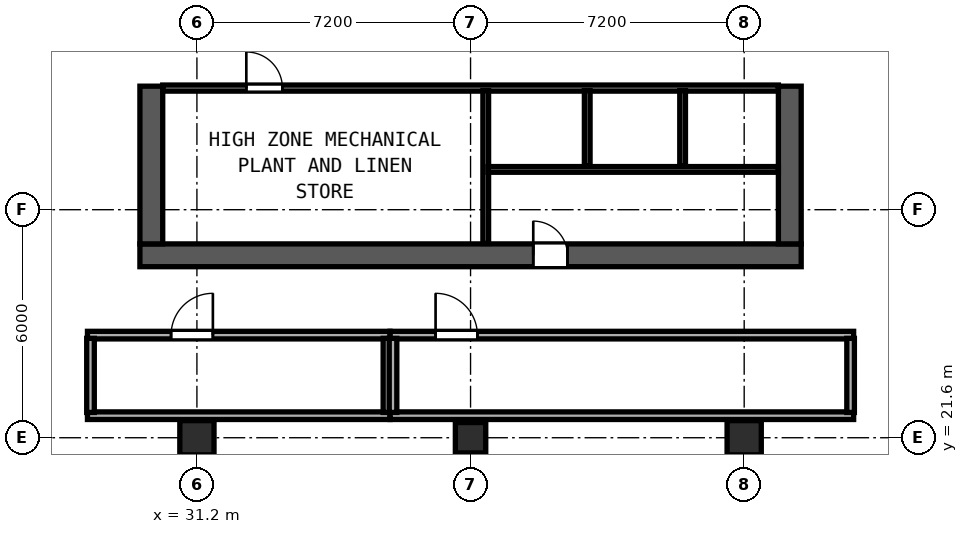
"""IFC4 building model, lengths in metres.
Left out: names, types, materials, properties, quantities, classifications, styles, units other than length and angle.
Written with IfcOpenShell. Run it as: python <this file> out.ifc"""

import sys

from ifc_helpers import new_model, si_unit, direction, frame, frame_2d, origin, origin_2d, place, context, subcontext, project, spatial, rectangle, hollow_rectangle, extrude, element, fill, save


model = new_model("IFC4")
c1 = context("Model", 3, precision=1e-05, world=origin(), true_north=direction((0.0, 1.0)))
c2 = subcontext(c1, "Body", "Model", "MODEL_VIEW")
j1 = project(units=[si_unit("LENGTHUNIT", "METRE"), si_unit("PLANEANGLEUNIT", "RADIAN")], contexts=[c1])
p1 = place(None, origin())
s1 = spatial("IfcSite", under=j1, at=p1, CompositionType="ELEMENT")
p2 = place(p1, origin())
s2 = spatial("IfcBuilding", under=s1, at=p2, CompositionType="ELEMENT")
p3 = place(p2, frame((0.0, 0.0, 207.0)))
s3 = spatial("IfcBuildingStorey", under=s2, at=p3, CompositionType="ELEMENT", Elevation=207.0)
p4 = place(p3, frame((29.7, 26.4, 0.0), z_axis=(0.0, 0.0, 1.0), x_axis=(1.0, 0.0, 0.0)))
e1 = element("IfcWall", 1, at=p4, inside=s3, PredefinedType="SHEAR", context=c2, shape_type="SweptSolid", body=[
    extrude(rectangle(XDim=17.4, YDim=0.6, at=frame_2d((8.7, 0.0))), origin(), (0.0, 0.0, 1.0), 4.42),
])
p5 = place(p4, frame((11.25, 0.0, 0.0), z_axis=(0.0, 0.0, 1.0), x_axis=(-1.0, 0.0, 0.0)))
e2 = element("IfcOpeningElement", 2, at=p5, cuts=e1, PredefinedType="OPENING", context=c2, shape_type="SweptSolid", body=[
    extrude(rectangle(XDim=0.9, YDim=2.1, at=frame_2d((0.45, 1.05))), frame((0.0, 0.31, 0.0), z_axis=(0.0, -1.0, 0.0), x_axis=(1.0, 0.0, 0.0)), (0.0, 0.0, 1.0), 0.62),
])
for number, where, z_axis, x_axis in (
    (3, (30.0, 26.7, 0.0), (0.0, 0.0, 1.0), (0.0, 1.0, 0.0)),
    (4, (46.8, 26.7, 0.0), (0.0, 0.0, 1.0), (0.0, 1.0, 0.0)),
):
    element("IfcWall", number, at=place(p3, frame(where, z_axis=z_axis, x_axis=x_axis)), inside=s3, PredefinedType="SHEAR", context=c2, shape_type="SweptSolid", body=[
        extrude(rectangle(XDim=4.15, YDim=0.6, at=frame_2d((2.075, 0.0))), origin(), (0.0, 0.0, 1.0), 4.42),
    ])
for number, where, z_axis, x_axis in (
    (5, (31.2, 21.6, 0.0), (0.0, 0.0, 1.0), (1.0, 0.0, 0.0)),
    (6, (45.6, 21.6, 0.0), (0.0, 0.0, 1.0), (1.0, 0.0, 0.0)),
):
    element("IfcColumn", number, at=place(p3, frame(where, z_axis=z_axis, x_axis=x_axis)), inside=s3, PredefinedType="COLUMN", context=c2, shape_type="SweptSolid", body=[
        extrude(hollow_rectangle(XDim=0.9, YDim=0.9, WallThickness=0.034, at=origin_2d()), origin(), (0.0, 0.0, 1.0), 4.6),
    ])
p6 = place(p3, frame((38.4, 21.6, 0.0), z_axis=(0.0, 0.0, 1.0), x_axis=(1.0, 0.0, 0.0)))
e7 = element("IfcColumn", 7, at=p6, inside=s3, PredefinedType="COLUMN", context=c2, shape_type="SweptSolid", body=[
    extrude(hollow_rectangle(XDim=0.8, YDim=0.8, WallThickness=0.03, at=origin_2d()), origin(), (0.0, 0.0, 1.0), 4.6),
])
p7 = place(p3, frame((47.987, 20.51, 0.0), z_axis=(0.0, 0.0, 1.0), x_axis=(0.970145687294, 0.242522876086, 0.0)))
e8 = element("IfcWall", 8, at=p7, inside=s3, PredefinedType="PARAPET", context=c2, shape_type="SweptSolid", body=[
    extrude(rectangle(XDim=4.506, YDim=0.16, at=frame_2d((2.253, 0.0))), origin(), (0.0, 0.0, 1.0), 1.15),
])
p8 = place(p3, frame((24.442, 21.603, 0.0), z_axis=(0.0, 0.0, 1.0), x_axis=(0.97014887394, -0.242510128435, 0.0)))
e9 = element("IfcWall", 9, at=p8, inside=s3, PredefinedType="PARAPET", context=c2, shape_type="SweptSolid", body=[
    extrude(rectangle(XDim=4.506, YDim=0.16, at=frame_2d((2.253, 0.0))), origin(), (0.0, 0.0, 1.0), 1.15),
])
p9 = place(p3, frame((30.3, 30.8, 0.0), z_axis=(0.0, 0.0, 1.0), x_axis=(1.0, 0.0, 0.0)))
e10 = element("IfcWall", 10, at=p9, inside=s3, PredefinedType="SOLIDWALL", context=c2, shape_type="SweptSolid", body=[
    extrude(rectangle(XDim=16.2, YDim=0.16, at=frame_2d((8.1, 0.0))), origin(), (0.0, 0.0, 1.0), 4.42),
])
p10 = place(p9, frame((2.2, 0.0, 0.0)))
e11 = element("IfcOpeningElement", 11, at=p10, cuts=e10, PredefinedType="OPENING", context=c2, shape_type="SweptSolid", body=[
    extrude(rectangle(XDim=0.95, YDim=2.12, at=frame_2d((0.475, 1.06))), frame((0.0, 0.09, 0.0), z_axis=(0.0, -1.0, 0.0), x_axis=(1.0, 0.0, 0.0)), (0.0, 0.0, 1.0), 0.18),
])
p11 = place(p3, frame((38.8, 26.71, 0.0), z_axis=(0.0, 0.0, 1.0), x_axis=(0.0, 1.0, 0.0)))
e12 = element("IfcWall", 12, at=p11, inside=s3, PredefinedType="SOLIDWALL", context=c2, shape_type="SweptSolid", body=[
    extrude(rectangle(XDim=4.025, YDim=0.15, at=frame_2d((2.013, 0.0))), origin(), (0.0, 0.0, 1.0), 4.42),
])
p12 = place(p3, frame((38.86, 28.66, 0.0), z_axis=(0.0, 0.0, 1.0), x_axis=(1.0, 0.0, 0.0)))
e13 = element("IfcWall", 13, at=p12, inside=s3, PredefinedType="PARTITIONING", context=c2, shape_type="SweptSolid", body=[
    extrude(rectangle(XDim=7.64, YDim=0.15, at=frame_2d((3.82, 0.0))), origin(), (0.0, 0.0, 1.0), 4.42),
])
for number, where, z_axis, x_axis in (
    (14, (41.47, 28.75, 0.0), (0.0, 0.0, 1.0), (0.0, 1.0, 0.0)),
    (15, (43.98, 28.75, 0.0), (0.0, 0.0, 1.0), (0.0, 1.0, 0.0)),
):
    element("IfcWall", number, at=place(p3, frame(where, z_axis=z_axis, x_axis=x_axis)), inside=s3, PredefinedType="SOLIDWALL", context=c2, shape_type="SweptSolid", body=[
        extrude(rectangle(XDim=1.985, YDim=0.15, at=frame_2d((0.993, 0.0))), origin(), (0.0, 0.0, 1.0), 4.42),
    ])
p13 = place(p3, frame((28.32, 24.3, 0.0), z_axis=(0.0, 0.0, 1.0), x_axis=(1.0, 0.0, 0.0)))
e16 = element("IfcWall", 16, at=p13, inside=s3, PredefinedType="SOLIDWALL", context=c2, shape_type="SweptSolid", body=[
    extrude(rectangle(XDim=7.96, YDim=0.2, at=frame_2d((3.98, 0.0))), origin(), (0.0, 0.0, 1.0), 4.42),
])
p14 = place(p13, frame((3.3, 0.0, 0.0), z_axis=(0.0, 0.0, 1.0), x_axis=(-1.0, 0.0, 0.0)))
e17 = element("IfcOpeningElement", 17, at=p14, cuts=e16, PredefinedType="OPENING", context=c2, shape_type="SweptSolid", body=[
    extrude(rectangle(XDim=1.1, YDim=2.15, at=frame_2d((0.55, 1.075))), frame((0.0, 0.11, 0.0), z_axis=(0.0, -1.0, 0.0), x_axis=(1.0, 0.0, 0.0)), (0.0, 0.0, 1.0), 0.22),
])
p15 = place(p3, frame((28.32, 22.18, 0.0), z_axis=(0.0, 0.0, 1.0), x_axis=(1.0, 0.0, 0.0)))
e18 = element("IfcWall", 18, at=p15, inside=s3, PredefinedType="SOLIDWALL", context=c2, shape_type="SweptSolid", body=[
    extrude(rectangle(XDim=7.96, YDim=0.2, at=frame_2d((3.98, 0.0))), origin(), (0.0, 0.0, 1.0), 4.42),
])
for number, where, z_axis, x_axis in (
    (19, (28.4, 22.265, 0.0), (0.0, 0.0, 1.0), (0.0, 1.0, 0.0)),
    (20, (36.2, 22.265, 0.0), (0.0, 0.0, 1.0), (0.0, 1.0, 0.0)),
):
    element("IfcWall", number, at=place(p3, frame(where, z_axis=z_axis, x_axis=x_axis)), inside=s3, PredefinedType="SOLIDWALL", context=c2, shape_type="SweptSolid", body=[
        extrude(rectangle(XDim=1.95, YDim=0.2, at=frame_2d((0.975, 0.0))), origin(), (0.0, 0.0, 1.0), 4.42),
    ])
p16 = place(p3, frame((36.285, 24.3, 0.0), z_axis=(0.0, 0.0, 1.0), x_axis=(1.0, 0.0, 0.0)))
e21 = element("IfcWall", 21, at=p16, inside=s3, PredefinedType="SOLIDWALL", context=c2, shape_type="SweptSolid", body=[
    extrude(rectangle(XDim=12.195, YDim=0.2, at=frame_2d((6.098, 0.0))), origin(), (0.0, 0.0, 1.0), 4.42),
])
p17 = place(p16, frame((2.295, 0.0, 0.0), z_axis=(0.0, 0.0, 1.0), x_axis=(-1.0, 0.0, 0.0)))
e22 = element("IfcOpeningElement", 22, at=p17, cuts=e21, PredefinedType="OPENING", context=c2, shape_type="SweptSolid", body=[
    extrude(rectangle(XDim=1.1, YDim=2.15, at=frame_2d((0.55, 1.075))), frame((0.0, 0.11, 0.0), z_axis=(0.0, -1.0, 0.0), x_axis=(1.0, 0.0, 0.0)), (0.0, 0.0, 1.0), 0.22),
])
p18 = place(p3, frame((36.285, 22.18, 0.0), z_axis=(0.0, 0.0, 1.0), x_axis=(1.0, 0.0, 0.0)))
e23 = element("IfcWall", 23, at=p18, inside=s3, PredefinedType="SOLIDWALL", context=c2, shape_type="SweptSolid", body=[
    extrude(rectangle(XDim=12.195, YDim=0.2, at=frame_2d((6.098, 0.0))), origin(), (0.0, 0.0, 1.0), 4.42),
])
for number, where, z_axis, x_axis in (
    (24, (36.36, 22.265, 0.0), (0.0, 0.0, 1.0), (0.0, 1.0, 0.0)),
    (25, (48.4, 22.265, 0.0), (0.0, 0.0, 1.0), (0.0, 1.0, 0.0)),
):
    element("IfcWall", number, at=place(p3, frame(where, z_axis=z_axis, x_axis=x_axis)), inside=s3, PredefinedType="SOLIDWALL", context=c2, shape_type="SweptSolid", body=[
        extrude(rectangle(XDim=1.95, YDim=0.2, at=frame_2d((0.975, 0.0))), origin(), (0.0, 0.0, 1.0), 4.42),
    ])
p19 = place(p10, origin())
e26 = element("IfcDoor", 26, at=p19, inside=s3, OperationType="SINGLE_SWING_LEFT", PredefinedType="DOOR", context=c2, shape_type="SweptSolid", body=[
    extrude(rectangle(XDim=0.95, YDim=2.12, at=frame_2d((0.475, 1.06))), frame((0.0, 0.025, 0.0), z_axis=(0.0, -1.0, 0.0), x_axis=(1.0, 0.0, 0.0)), (0.0, 0.0, 1.0), 0.05),
])
fill(e11, e26)
p20 = place(p5, origin())
e27 = element("IfcDoor", 27, at=p20, inside=s3, OperationType="SINGLE_SWING_RIGHT", PredefinedType="DOOR", context=c2, shape_type="SweptSolid", body=[
    extrude(rectangle(XDim=0.9, YDim=2.1, at=frame_2d((0.45, 1.05))), frame((0.0, -0.195, 0.0), z_axis=(0.0, -1.0, 0.0), x_axis=(1.0, 0.0, 0.0)), (0.0, 0.0, 1.0), 0.05),
])
fill(e2, e27)
p21 = place(p14, origin())
e28 = element("IfcDoor", 28, at=p21, inside=s3, OperationType="SINGLE_SWING_LEFT", PredefinedType="DOOR", context=c2, shape_type="SweptSolid", body=[
    extrude(rectangle(XDim=1.1, YDim=2.15, at=frame_2d((0.55, 1.075))), frame((0.0, 0.025, 0.0), z_axis=(0.0, -1.0, 0.0), x_axis=(1.0, 0.0, 0.0)), (0.0, 0.0, 1.0), 0.05),
])
fill(e17, e28)
p22 = place(p17, origin())
e29 = element("IfcDoor", 29, at=p22, inside=s3, OperationType="SINGLE_SWING_RIGHT", PredefinedType="DOOR", context=c2, shape_type="SweptSolid", body=[
    extrude(rectangle(XDim=1.1, YDim=2.15, at=frame_2d((0.55, 1.075))), frame((0.0, 0.025, 0.0), z_axis=(0.0, -1.0, 0.0), x_axis=(1.0, 0.0, 0.0)), (0.0, 0.0, 1.0), 0.05),
])
fill(e22, e29)
save(model, sys.argv[1])
